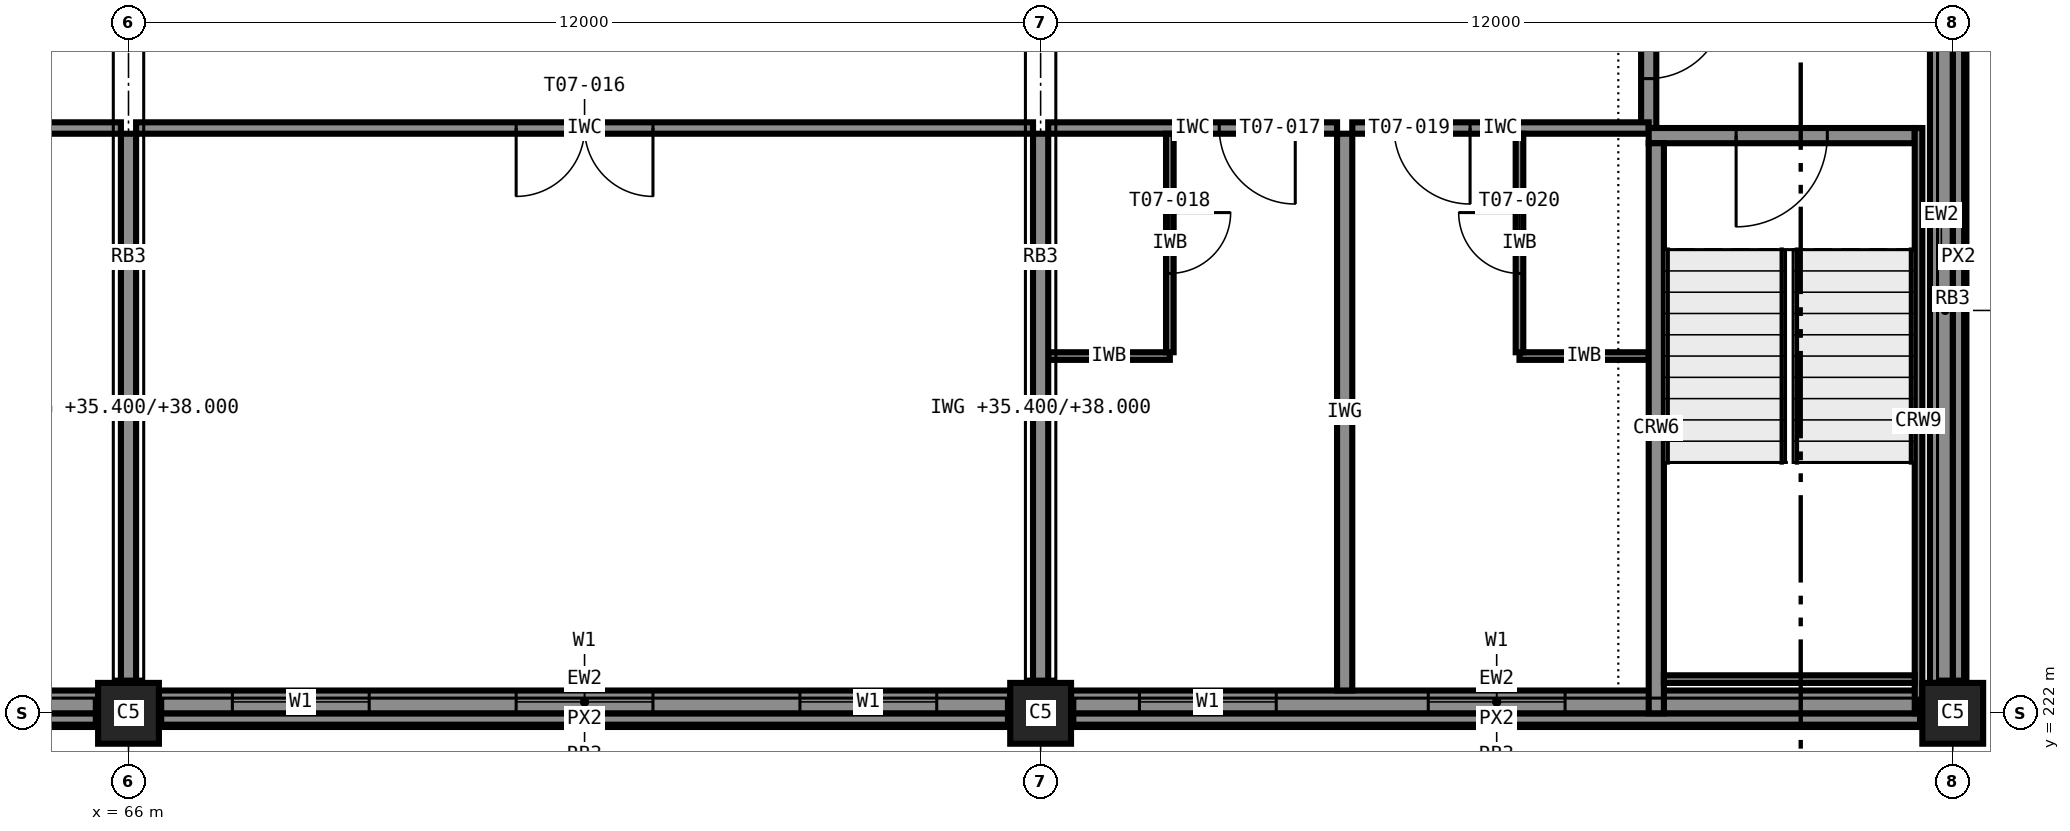
"""IFC4 building model, lengths in metres.
Left out: names, types, materials, properties, quantities, classifications, styles, units other than length and angle.
Written with IfcOpenShell. Run it as: python <this file> out.ifc"""

import sys

from ifc_helpers import new_model, si_unit, direction, frame, frame_2d, origin, origin_2d, place, context, subcontext, project, spatial, rectangle, extrude, element, fill, save


model = new_model("IFC4")
c1 = context("Model", 3, precision=1e-05, world=origin(), true_north=direction((0.0, 1.0)))
c2 = subcontext(c1, "Body", "Model", "MODEL_VIEW")
j1 = project(units=[si_unit("LENGTHUNIT", "METRE"), si_unit("PLANEANGLEUNIT", "RADIAN")], contexts=[c1])
p1 = place(None, origin())
s1 = spatial("IfcSite", under=j1, at=p1, CompositionType="ELEMENT")
p2 = place(p1, origin())
s2 = spatial("IfcBuilding", under=s1, at=p2, CompositionType="ELEMENT")
p3 = place(p2, frame((0.0, 0.0, 35.4)))
s3 = spatial("IfcBuildingStorey", under=s2, at=p3, CompositionType="ELEMENT", Elevation=35.4)
for number, where, z_axis, x_axis in (
    (1, (66.0, 222.0, 0.0), (0.0, 0.0, 1.0), (1.0, 0.0, 0.0)),
    (2, (78.0, 222.0, 0.0), (0.0, 0.0, 1.0), (1.0, 0.0, 0.0)),
    (3, (90.0, 222.0, 0.0), (0.0, 0.0, 1.0), (1.0, 0.0, 0.0)),
):
    element("IfcColumn", number, at=place(p3, frame(where, z_axis=z_axis, x_axis=x_axis)), inside=s3, PredefinedType="COLUMN", context=c2, shape_type="SweptSolid", body=[
        extrude(rectangle(XDim=0.8, YDim=0.8, at=origin_2d()), origin(), (0.0, 0.0, 1.0), 3.6),
    ])
p4 = place(p3, frame((89.5, 229.6, 0.0), z_axis=(0.0, 0.0, 1.0), x_axis=(-1.0, 0.0, 0.0)))
e4 = element("IfcWall", 4, at=p4, inside=s3, PredefinedType="SHEAR", context=c2, shape_type="SweptSolid", body=[
    extrude(rectangle(XDim=3.5, YDim=0.2, at=frame_2d((1.75, 0.0))), origin(), (0.0, 0.0, 1.0), 3.6),
])
p5 = place(p4, frame((1.15, 0.0, 0.0)))
e5 = element("IfcOpeningElement", 5, at=p5, cuts=e4, PredefinedType="OPENING", context=c2, shape_type="SweptSolid", body=[
    extrude(rectangle(XDim=1.2, YDim=2.1, at=frame_2d((0.6, 1.05))), frame((0.0, 0.11, 0.0), z_axis=(0.0, -1.0, 0.0), x_axis=(1.0, 0.0, 0.0)), (0.0, 0.0, 1.0), 0.22),
])
p6 = place(p3, frame((86.1, 222.0, 0.0), z_axis=(0.0, 0.0, 1.0), x_axis=(0.0, 1.0, 0.0)))
e6 = element("IfcWall", 6, at=p6, inside=s3, PredefinedType="SHEAR", context=c2, shape_type="SweptSolid", body=[
    extrude(rectangle(XDim=7.5, YDim=0.2, at=frame_2d((3.75, 0.0))), origin(), (0.0, 0.0, 1.0), 3.6),
])
p7 = place(p3, frame((89.55, 229.7, 0.0), z_axis=(0.0, 0.0, 1.0), x_axis=(0.0, -1.0, 0.0)))
e7 = element("IfcWall", 7, at=p7, inside=s3, PredefinedType="SHEAR", context=c2, shape_type="SweptSolid", body=[
    extrude(rectangle(XDim=7.7, YDim=0.1, at=frame_2d((3.85, 0.0))), origin(), (0.0, 0.0, 1.0), 3.4),
])
p8 = place(p3, frame((89.5, 222.45, 0.0), z_axis=(0.0, 0.0, 1.0), x_axis=(-1.0, 0.0, 0.0)))
e8 = element("IfcWall", 8, at=p8, inside=s3, PredefinedType="SHEAR", context=c2, shape_type="SweptSolid", body=[
    extrude(rectangle(XDim=3.3, YDim=0.1, at=frame_2d((1.65, 0.0))), origin(), (0.0, 0.0, 1.0), 3.4),
])
p9 = place(p3, frame((54.4, 222.15, 0.0), z_axis=(0.0, 0.0, 1.0), x_axis=(1.0, 0.0, 0.0)))
e9 = element("IfcWall", 9, at=p9, inside=s3, PredefinedType="STANDARD", context=c2, shape_type="SweptSolid", body=[
    extrude(rectangle(XDim=11.2, YDim=0.3, at=frame_2d((5.6, 0.0))), origin(), (0.0, 0.0, 1.0), 2.6),
])
p10 = place(p9, frame((1.9, 0.0, 0.85)))
e10 = element("IfcOpeningElement", 10, at=p10, cuts=e9, PredefinedType="OPENING", context=c2, shape_type="SweptSolid", body=[
    extrude(rectangle(XDim=1.8, YDim=1.75, at=frame_2d((0.9, 0.875))), frame((0.0, 0.16, 0.0), z_axis=(0.0, -1.0, 0.0), x_axis=(1.0, 0.0, 0.0)), (0.0, 0.0, 1.0), 0.32),
])
p11 = place(p9, frame((7.5, 0.0, 0.85)))
e11 = element("IfcOpeningElement", 11, at=p11, cuts=e9, PredefinedType="OPENING", context=c2, shape_type="SweptSolid", body=[
    extrude(rectangle(XDim=1.8, YDim=1.75, at=frame_2d((0.9, 0.875))), frame((0.0, 0.16, 0.0), z_axis=(0.0, -1.0, 0.0), x_axis=(1.0, 0.0, 0.0)), (0.0, 0.0, 1.0), 0.32),
])
p12 = place(p3, frame((66.4, 222.15, 0.0), z_axis=(0.0, 0.0, 1.0), x_axis=(1.0, 0.0, 0.0)))
e12 = element("IfcWall", 12, at=p12, inside=s3, PredefinedType="STANDARD", context=c2, shape_type="SweptSolid", body=[
    extrude(rectangle(XDim=11.2, YDim=0.3, at=frame_2d((5.6, 0.0))), origin(), (0.0, 0.0, 1.0), 2.6),
])
p13 = place(p12, frame((0.967, 0.0, 0.85)))
e13 = element("IfcOpeningElement", 13, at=p13, cuts=e12, PredefinedType="OPENING", context=c2, shape_type="SweptSolid", body=[
    extrude(rectangle(XDim=1.8, YDim=1.75, at=frame_2d((0.9, 0.875))), frame((0.0, 0.16, 0.0), z_axis=(0.0, -1.0, 0.0), x_axis=(1.0, 0.0, 0.0)), (0.0, 0.0, 1.0), 0.32),
])
p14 = place(p12, frame((4.7, 0.0, 0.85)))
e14 = element("IfcOpeningElement", 14, at=p14, cuts=e12, PredefinedType="OPENING", context=c2, shape_type="SweptSolid", body=[
    extrude(rectangle(XDim=1.8, YDim=1.75, at=frame_2d((0.9, 0.875))), frame((0.0, 0.16, 0.0), z_axis=(0.0, -1.0, 0.0), x_axis=(1.0, 0.0, 0.0)), (0.0, 0.0, 1.0), 0.32),
])
p15 = place(p12, frame((8.433, 0.0, 0.85)))
e15 = element("IfcOpeningElement", 15, at=p15, cuts=e12, PredefinedType="OPENING", context=c2, shape_type="SweptSolid", body=[
    extrude(rectangle(XDim=1.8, YDim=1.75, at=frame_2d((0.9, 0.875))), frame((0.0, 0.16, 0.0), z_axis=(0.0, -1.0, 0.0), x_axis=(1.0, 0.0, 0.0)), (0.0, 0.0, 1.0), 0.32),
])
p16 = place(p3, frame((78.4, 222.15, 0.0), z_axis=(0.0, 0.0, 1.0), x_axis=(1.0, 0.0, 0.0)))
e16 = element("IfcWall", 16, at=p16, inside=s3, PredefinedType="STANDARD", context=c2, shape_type="SweptSolid", body=[
    extrude(rectangle(XDim=11.2, YDim=0.3, at=frame_2d((5.6, 0.0))), origin(), (0.0, 0.0, 1.0), 2.6),
])
p17 = place(p16, frame((0.9, 0.0, 0.85)))
e17 = element("IfcOpeningElement", 17, at=p17, cuts=e16, PredefinedType="OPENING", context=c2, shape_type="SweptSolid", body=[
    extrude(rectangle(XDim=1.8, YDim=1.75, at=frame_2d((0.9, 0.875))), frame((0.0, 0.16, 0.0), z_axis=(0.0, -1.0, 0.0), x_axis=(1.0, 0.0, 0.0)), (0.0, 0.0, 1.0), 0.32),
])
p18 = place(p16, frame((4.7, 0.0, 0.85)))
e18 = element("IfcOpeningElement", 18, at=p18, cuts=e16, PredefinedType="OPENING", context=c2, shape_type="SweptSolid", body=[
    extrude(rectangle(XDim=1.8, YDim=1.75, at=frame_2d((0.9, 0.875))), frame((0.0, 0.16, 0.0), z_axis=(0.0, -1.0, 0.0), x_axis=(1.0, 0.0, 0.0)), (0.0, 0.0, 1.0), 0.32),
])
for number, where, z_axis, x_axis in (
    (19, (54.4, 221.925, 3.4), (0.0, 0.0, 1.0), (1.0, 0.0, 0.0)),
    (20, (66.4, 221.925, 3.4), (0.0, 0.0, 1.0), (1.0, 0.0, 0.0)),
    (21, (78.4, 221.925, 3.4), (0.0, 0.0, 1.0), (1.0, 0.0, 0.0)),
):
    element("IfcWall", number, at=place(p3, frame(where, z_axis=z_axis, x_axis=x_axis)), inside=s3, PredefinedType="STANDARD", context=c2, shape_type="SweptSolid", body=[
        extrude(rectangle(XDim=11.2, YDim=0.15, at=frame_2d((5.6, 0.0))), origin(), (0.0, 0.0, 1.0), 0.2),
    ])
p19 = place(p3, frame((89.85, 222.4, 0.0), z_axis=(0.0, 0.0, 1.0), x_axis=(0.0, 1.0, 0.0)))
e22 = element("IfcWall", 22, at=p19, inside=s3, PredefinedType="STANDARD", context=c2, shape_type="SweptSolid", body=[
    extrude(rectangle(XDim=11.2, YDim=0.3, at=frame_2d((5.6, 0.0))), origin(), (0.0, 0.0, 1.0), 2.6),
])
p20 = place(p3, frame((90.075, 222.4, 3.4), z_axis=(0.0, 0.0, 1.0), x_axis=(0.0, 1.0, 0.0)))
e23 = element("IfcWall", 23, at=p20, inside=s3, PredefinedType="STANDARD", context=c2, shape_type="SweptSolid", body=[
    extrude(rectangle(XDim=11.2, YDim=0.15, at=frame_2d((5.6, 0.0))), origin(), (0.0, 0.0, 1.0), 0.2),
])
p21 = place(p3, frame((86.0, 232.0, 0.0), z_axis=(0.0, 0.0, 1.0), x_axis=(0.0, -1.0, 0.0)))
e24 = element("IfcWall", 24, at=p21, inside=s3, PredefinedType="PARTITIONING", context=c2, shape_type="SweptSolid", body=[
    extrude(rectangle(XDim=2.3, YDim=0.2, at=frame_2d((1.15, 0.0))), origin(), (0.0, 0.0, 1.0), 3.4),
])
p22 = place(p21, frame((0.65, 0.0, 0.0)))
e25 = element("IfcOpeningElement", 25, at=p22, cuts=e24, PredefinedType="OPENING", context=c2, shape_type="SweptSolid", body=[
    extrude(rectangle(XDim=1.0, YDim=2.1, at=frame_2d((0.5, 1.05))), frame((0.0, 0.11, 0.0), z_axis=(0.0, -1.0, 0.0), x_axis=(1.0, 0.0, 0.0)), (0.0, 0.0, 1.0), 0.22),
])
p23 = place(p3, frame((65.9, 229.7, 0.0), z_axis=(0.0, 0.0, 1.0), x_axis=(-1.0, 0.0, 0.0)))
e26 = element("IfcWall", 26, at=p23, inside=s3, PredefinedType="PARTITIONING", context=c2, shape_type="SweptSolid", body=[
    extrude(rectangle(XDim=5.8, YDim=0.15, at=frame_2d((2.9, 0.0))), origin(), (0.0, 0.0, 1.0), 3.4),
])
p24 = place(p23, frame((1.2, 0.0, 0.0)))
e27 = element("IfcOpeningElement", 27, at=p24, cuts=e26, PredefinedType="OPENING", context=c2, shape_type="SweptSolid", body=[
    extrude(rectangle(XDim=1.0, YDim=2.1, at=frame_2d((0.5, 1.05))), frame((0.0, 0.085, 0.0), z_axis=(0.0, -1.0, 0.0), x_axis=(1.0, 0.0, 0.0)), (0.0, 0.0, 1.0), 0.17),
])
p25 = place(p3, frame((77.9, 229.7, 0.0), z_axis=(0.0, 0.0, 1.0), x_axis=(-1.0, 0.0, 0.0)))
e28 = element("IfcWall", 28, at=p25, inside=s3, PredefinedType="PARTITIONING", context=c2, shape_type="SweptSolid", body=[
    extrude(rectangle(XDim=11.8, YDim=0.15, at=frame_2d((5.9, 0.0))), origin(), (0.0, 0.0, 1.0), 3.4),
])
p26 = place(p25, frame((5.0, 0.0, 0.0)))
e29 = element("IfcOpeningElement", 29, at=p26, cuts=e28, PredefinedType="OPENING", context=c2, shape_type="SweptSolid", body=[
    extrude(rectangle(XDim=1.8, YDim=2.1, at=frame_2d((0.9, 1.05))), frame((0.0, 0.085, 0.0), z_axis=(0.0, -1.0, 0.0), x_axis=(1.0, 0.0, 0.0)), (0.0, 0.0, 1.0), 0.17),
])
p27 = place(p3, frame((81.9, 229.7, 0.0), z_axis=(0.0, 0.0, 1.0), x_axis=(-1.0, 0.0, 0.0)))
e30 = element("IfcWall", 30, at=p27, inside=s3, PredefinedType="PARTITIONING", context=c2, shape_type="SweptSolid", body=[
    extrude(rectangle(XDim=3.8, YDim=0.15, at=frame_2d((1.9, 0.0))), origin(), (0.0, 0.0, 1.0), 3.4),
])
p28 = place(p27, frame((0.55, 0.0, 0.0)))
e31 = element("IfcOpeningElement", 31, at=p28, cuts=e30, PredefinedType="OPENING", context=c2, shape_type="SweptSolid", body=[
    extrude(rectangle(XDim=1.0, YDim=2.1, at=frame_2d((0.5, 1.05))), frame((0.0, 0.085, 0.0), z_axis=(0.0, -1.0, 0.0), x_axis=(1.0, 0.0, 0.0)), (0.0, 0.0, 1.0), 0.17),
])
p29 = place(p3, frame((78.1, 226.7, 0.0), z_axis=(0.0, 0.0, 1.0), x_axis=(1.0, 0.0, 0.0)))
e32 = element("IfcWall", 32, at=p29, inside=s3, PredefinedType="PARTITIONING", context=c2, shape_type="SweptSolid", body=[
    extrude(rectangle(XDim=1.6, YDim=0.1, at=frame_2d((0.8, 0.0))), origin(), (0.0, 0.0, 1.0), 3.4),
])
p30 = place(p3, frame((79.7, 229.625, 0.0), z_axis=(0.0, 0.0, 1.0), x_axis=(0.0, -1.0, 0.0)))
e33 = element("IfcWall", 33, at=p30, inside=s3, PredefinedType="PARTITIONING", context=c2, shape_type="SweptSolid", body=[
    extrude(rectangle(XDim=2.875, YDim=0.1, at=frame_2d((1.438, 0.0))), origin(), (0.0, 0.0, 1.0), 3.4),
])
p31 = place(p30, frame((1.038, 0.0, 0.0)))
e34 = element("IfcOpeningElement", 34, at=p31, cuts=e33, PredefinedType="OPENING", context=c2, shape_type="SweptSolid", body=[
    extrude(rectangle(XDim=0.8, YDim=2.1, at=frame_2d((0.4, 1.05))), frame((0.0, 0.06, 0.0), z_axis=(0.0, -1.0, 0.0), x_axis=(1.0, 0.0, 0.0)), (0.0, 0.0, 1.0), 0.12),
])
p32 = place(p3, frame((86.0, 229.7, 0.0), z_axis=(0.0, 0.0, 1.0), x_axis=(-1.0, 0.0, 0.0)))
e35 = element("IfcWall", 35, at=p32, inside=s3, PredefinedType="PARTITIONING", context=c2, shape_type="SweptSolid", body=[
    extrude(rectangle(XDim=3.9, YDim=0.15, at=frame_2d((1.95, 0.0))), origin(), (0.0, 0.0, 1.0), 3.4),
])
p33 = place(p32, frame((2.35, 0.0, 0.0)))
e36 = element("IfcOpeningElement", 36, at=p33, cuts=e35, PredefinedType="OPENING", context=c2, shape_type="SweptSolid", body=[
    extrude(rectangle(XDim=1.0, YDim=2.1, at=frame_2d((0.5, 1.05))), frame((0.0, 0.085, 0.0), z_axis=(0.0, -1.0, 0.0), x_axis=(1.0, 0.0, 0.0)), (0.0, 0.0, 1.0), 0.17),
])
p34 = place(p3, frame((84.3, 226.7, 0.0), z_axis=(0.0, 0.0, 1.0), x_axis=(1.0, 0.0, 0.0)))
e37 = element("IfcWall", 37, at=p34, inside=s3, PredefinedType="PARTITIONING", context=c2, shape_type="SweptSolid", body=[
    extrude(rectangle(XDim=1.7, YDim=0.1, at=frame_2d((0.85, 0.0))), origin(), (0.0, 0.0, 1.0), 3.4),
])
p35 = place(p3, frame((84.3, 226.75, 0.0), z_axis=(0.0, 0.0, 1.0), x_axis=(0.0, 1.0, 0.0)))
e38 = element("IfcWall", 38, at=p35, inside=s3, PredefinedType="PARTITIONING", context=c2, shape_type="SweptSolid", body=[
    extrude(rectangle(XDim=2.875, YDim=0.1, at=frame_2d((1.438, 0.0))), origin(), (0.0, 0.0, 1.0), 3.4),
])
p36 = place(p35, frame((1.038, 0.0, 0.0)))
e39 = element("IfcOpeningElement", 39, at=p36, cuts=e38, PredefinedType="OPENING", context=c2, shape_type="SweptSolid", body=[
    extrude(rectangle(XDim=0.8, YDim=2.1, at=frame_2d((0.4, 1.05))), frame((0.0, 0.06, 0.0), z_axis=(0.0, -1.0, 0.0), x_axis=(1.0, 0.0, 0.0)), (0.0, 0.0, 1.0), 0.12),
])
for number, where, z_axis, x_axis in (
    (40, (66.0, 222.4, 0.0), (0.0, 0.0, 1.0), (0.0, 1.0, 0.0)),
    (41, (78.0, 222.4, 0.0), (0.0, 0.0, 1.0), (0.0, 1.0, 0.0)),
):
    element("IfcWall", number, at=place(p3, frame(where, z_axis=z_axis, x_axis=x_axis)), inside=s3, PredefinedType="PARTITIONING", context=c2, shape_type="SweptSolid", body=[
        extrude(rectangle(XDim=7.225, YDim=0.2, at=frame_2d((3.613, 0.0))), origin(), (0.0, 0.0, 1.0), 2.6),
    ])
p37 = place(p3, frame((82.0, 222.3, 0.0), z_axis=(0.0, 0.0, 1.0), x_axis=(0.0, 1.0, 0.0)))
e42 = element("IfcWall", 42, at=p37, inside=s3, PredefinedType="PARTITIONING", context=c2, shape_type="SweptSolid", body=[
    extrude(rectangle(XDim=7.325, YDim=0.2, at=frame_2d((3.663, 0.0))), origin(), (0.0, 0.0, 1.0), 3.4),
])
p38 = place(p13, origin())
e43 = element("IfcWindow", 43, at=p38, inside=s3, PartitioningType="SINGLE_PANEL", PredefinedType="WINDOW", context=c2, shape_type="SweptSolid", body=[
    extrude(rectangle(XDim=1.8, YDim=1.75, at=frame_2d((0.9, 0.875))), frame((0.0, 0.03, 0.0), z_axis=(0.0, -1.0, 0.0), x_axis=(1.0, 0.0, 0.0)), (0.0, 0.0, 1.0), 0.06),
])
fill(e13, e43)
p39 = place(p14, origin())
e44 = element("IfcWindow", 44, at=p39, inside=s3, PartitioningType="SINGLE_PANEL", PredefinedType="WINDOW", context=c2, shape_type="SweptSolid", body=[
    extrude(rectangle(XDim=1.8, YDim=1.75, at=frame_2d((0.9, 0.875))), frame((0.0, 0.03, 0.0), z_axis=(0.0, -1.0, 0.0), x_axis=(1.0, 0.0, 0.0)), (0.0, 0.0, 1.0), 0.06),
])
fill(e14, e44)
p40 = place(p15, origin())
e45 = element("IfcWindow", 45, at=p40, inside=s3, PartitioningType="SINGLE_PANEL", PredefinedType="WINDOW", context=c2, shape_type="SweptSolid", body=[
    extrude(rectangle(XDim=1.8, YDim=1.75, at=frame_2d((0.9, 0.875))), frame((0.0, 0.03, 0.0), z_axis=(0.0, -1.0, 0.0), x_axis=(1.0, 0.0, 0.0)), (0.0, 0.0, 1.0), 0.06),
])
fill(e15, e45)
p41 = place(p17, origin())
e46 = element("IfcWindow", 46, at=p41, inside=s3, PartitioningType="SINGLE_PANEL", PredefinedType="WINDOW", context=c2, shape_type="SweptSolid", body=[
    extrude(rectangle(XDim=1.8, YDim=1.75, at=frame_2d((0.9, 0.875))), frame((0.0, 0.03, 0.0), z_axis=(0.0, -1.0, 0.0), x_axis=(1.0, 0.0, 0.0)), (0.0, 0.0, 1.0), 0.06),
])
fill(e17, e46)
p42 = place(p18, origin())
e47 = element("IfcWindow", 47, at=p42, inside=s3, PartitioningType="SINGLE_PANEL", PredefinedType="WINDOW", context=c2, shape_type="SweptSolid", body=[
    extrude(rectangle(XDim=1.8, YDim=1.75, at=frame_2d((0.9, 0.875))), frame((0.0, 0.03, 0.0), z_axis=(0.0, -1.0, 0.0), x_axis=(1.0, 0.0, 0.0)), (0.0, 0.0, 1.0), 0.06),
])
fill(e18, e47)
p43 = place(p22, origin())
e48 = element("IfcDoor", 48, at=p43, inside=s3, OperationType="SINGLE_SWING_LEFT", PredefinedType="DOOR", context=c2, shape_type="SweptSolid", body=[
    extrude(rectangle(XDim=1.0, YDim=2.1, at=frame_2d((0.5, 1.05))), frame((0.0, 0.025, 0.0), z_axis=(0.0, -1.0, 0.0), x_axis=(1.0, 0.0, 0.0)), (0.0, 0.0, 1.0), 0.05),
])
fill(e25, e48)
p44 = place(p26, origin())
e49 = element("IfcDoor", 49, at=p44, inside=s3, OperationType="DOUBLE_DOOR_SINGLE_SWING", PredefinedType="DOOR", context=c2, shape_type="SweptSolid", body=[
    extrude(rectangle(XDim=1.8, YDim=2.1, at=frame_2d((0.9, 1.05))), frame((0.0, 0.025, 0.0), z_axis=(0.0, -1.0, 0.0), x_axis=(1.0, 0.0, 0.0)), (0.0, 0.0, 1.0), 0.05),
])
fill(e29, e49)
p45 = place(p28, origin())
e50 = element("IfcDoor", 50, at=p45, inside=s3, OperationType="SINGLE_SWING_LEFT", PredefinedType="DOOR", context=c2, shape_type="SweptSolid", body=[
    extrude(rectangle(XDim=1.0, YDim=2.1, at=frame_2d((0.5, 1.05))), frame((0.0, 0.025, 0.0), z_axis=(0.0, -1.0, 0.0), x_axis=(1.0, 0.0, 0.0)), (0.0, 0.0, 1.0), 0.05),
])
fill(e31, e50)
p46 = place(p31, origin())
e51 = element("IfcDoor", 51, at=p46, inside=s3, OperationType="SINGLE_SWING_LEFT", PredefinedType="DOOR", context=c2, shape_type="SweptSolid", body=[
    extrude(rectangle(XDim=0.8, YDim=2.1, at=frame_2d((0.4, 1.05))), frame((0.0, 0.025, 0.0), z_axis=(0.0, -1.0, 0.0), x_axis=(1.0, 0.0, 0.0)), (0.0, 0.0, 1.0), 0.05),
])
fill(e34, e51)
p47 = place(p33, origin())
e52 = element("IfcDoor", 52, at=p47, inside=s3, OperationType="SINGLE_SWING_LEFT", PredefinedType="DOOR", context=c2, shape_type="SweptSolid", body=[
    extrude(rectangle(XDim=1.0, YDim=2.1, at=frame_2d((0.5, 1.05))), frame((0.0, 0.025, 0.0), z_axis=(0.0, -1.0, 0.0), x_axis=(1.0, 0.0, 0.0)), (0.0, 0.0, 1.0), 0.05),
])
fill(e36, e52)
p48 = place(p36, origin())
e53 = element("IfcDoor", 53, at=p48, inside=s3, OperationType="SINGLE_SWING_RIGHT", PredefinedType="DOOR", context=c2, shape_type="SweptSolid", body=[
    extrude(rectangle(XDim=0.8, YDim=2.1, at=frame_2d((0.4, 1.05))), frame((0.0, 0.025, 0.0), z_axis=(0.0, -1.0, 0.0), x_axis=(1.0, 0.0, 0.0)), (0.0, 0.0, 1.0), 0.05),
])
fill(e39, e53)
p49 = place(p5, origin())
e54 = element("IfcDoor", 54, at=p49, inside=s3, OperationType="SINGLE_SWING_RIGHT", PredefinedType="DOOR", context=c2, shape_type="SweptSolid", body=[
    extrude(rectangle(XDim=1.2, YDim=2.1, at=frame_2d((0.6, 1.05))), frame((0.0, 0.025, 0.0), z_axis=(0.0, -1.0, 0.0), x_axis=(1.0, 0.0, 0.0)), (0.0, 0.0, 1.0), 0.05),
])
fill(e5, e54)
save(model, sys.argv[1])
